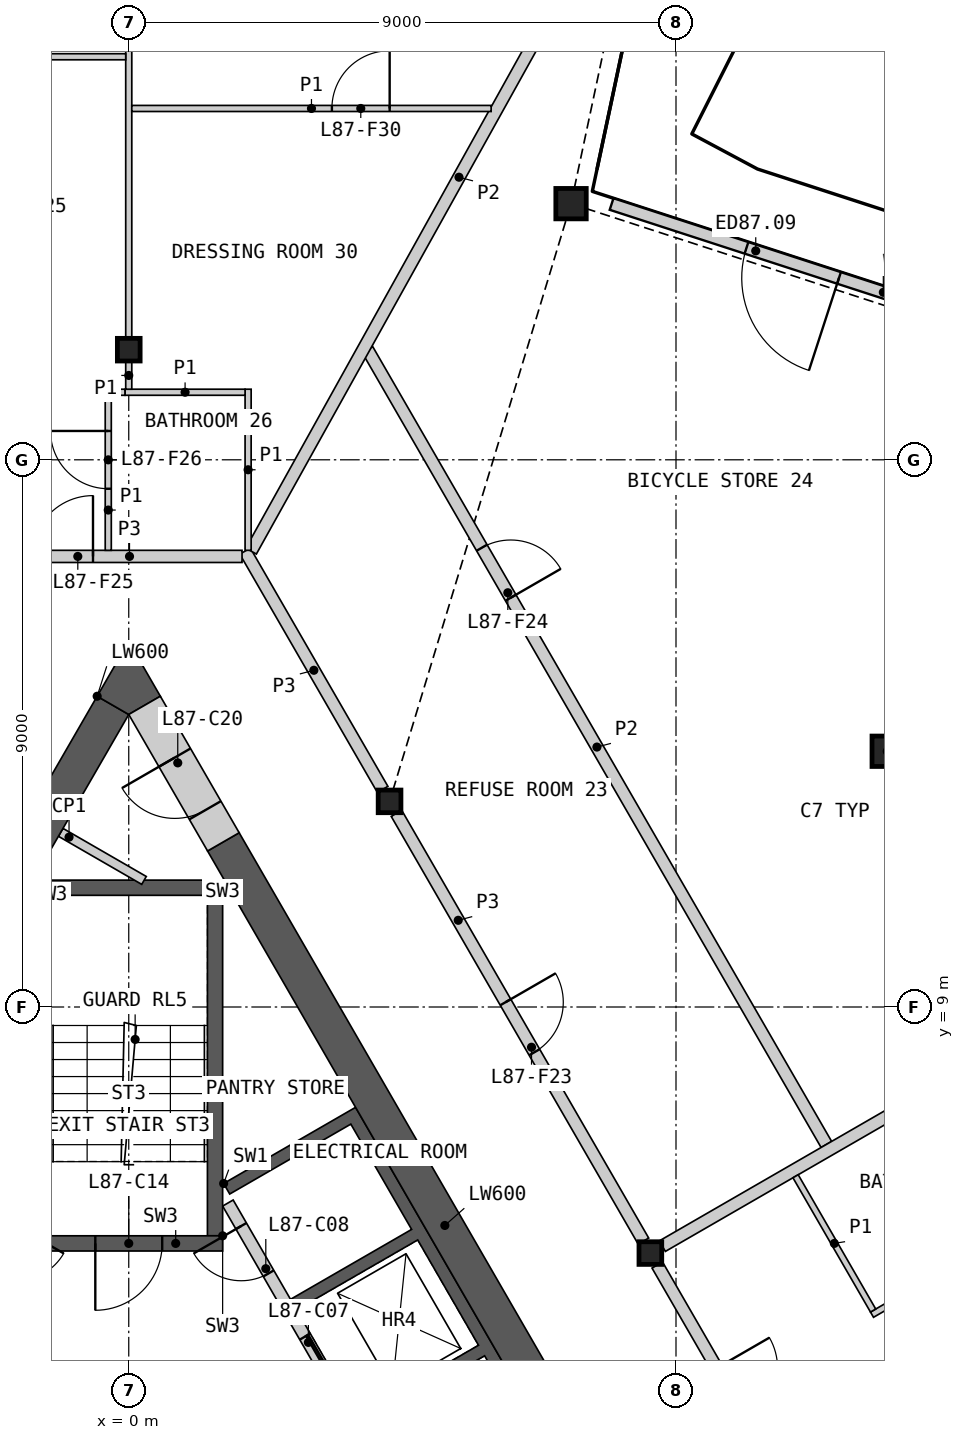
"""IFC4 building model, lengths in metres.
Left out: names, types, materials, properties, quantities, classifications, styles, units other than length and angle.
Written with IfcOpenShell. Run it as: python <this file> out.ifc"""

import sys

from ifc_helpers import new_model, si_unit, direction, frame, frame_2d, origin, origin_2d, place, context, subcontext, project, spatial, polyline, rectangle, hollow_rectangle, i_section, outline, extrude, element, fill, save


model = new_model("IFC4")
c1 = context("Model", 3, precision=1e-05, world=origin(), true_north=direction((0.0, 1.0)))
c2 = subcontext(c1, "Body", "Model", "MODEL_VIEW")
j1 = project(units=[si_unit("LENGTHUNIT", "METRE"), si_unit("PLANEANGLEUNIT", "RADIAN")], contexts=[c1])
p1 = place(None, origin())
s1 = spatial("IfcSite", under=j1, at=p1, CompositionType="ELEMENT")
p2 = place(p1, origin())
s2 = spatial("IfcBuilding", under=s1, at=p2, CompositionType="ELEMENT")
p3 = place(p2, frame((0.0, 0.0, 384.8)))
s3 = spatial("IfcBuildingStorey", under=s2, at=p3, CompositionType="ELEMENT", Elevation=384.8)
for number, where, z_axis, x_axis in (
    (1, (12.474, 13.206, 0.0), (0.0, 0.0, 1.0), (1.0, 0.0, 0.0)),
    (2, (7.274, 22.213, 0.0), (0.0, 0.0, 1.0), (1.0, 0.0, 0.0)),
):
    element("IfcColumn", number, at=place(p3, frame(where, z_axis=z_axis, x_axis=x_axis)), inside=s3, PredefinedType="COLUMN", context=c2, shape_type="SweptSolid", body=[
        extrude(hollow_rectangle(XDim=0.5, YDim=0.5, WallThickness=0.03, at=origin_2d()), origin(), (0.0, 0.0, 1.0), 3.4),
    ])
for number, where, z_axis, x_axis in (
    (3, (0.0, 19.811, 0.0), (0.0, 0.0, 1.0), (1.0, 0.0, 0.0)),
    (4, (8.578, 4.953, 0.0), (0.0, 0.0, 1.0), (1.0, 0.0, 0.0)),
    (5, (4.289, 12.382, 0.0), (0.0, 0.0, 1.0), (1.0, 0.0, 0.0)),
):
    element("IfcColumn", number, at=place(p3, frame(where, z_axis=z_axis, x_axis=x_axis)), inside=s3, PredefinedType="COLUMN", context=c2, shape_type="SweptSolid", body=[
        extrude(i_section(OverallWidth=0.374, OverallDepth=0.372, WebThickness=0.016, FlangeThickness=0.026, at=origin_2d()), origin(), (0.0, 0.0, 1.0), 3.4),
    ])
p4 = place(p3, frame((13.899, 20.271, 0.0), z_axis=(0.0, 0.0, 1.0), x_axis=(-0.951056402988, 0.3090173431, 0.0)))
e6 = element("IfcWall", 6, at=p4, inside=s3, PredefinedType="SOLIDWALL", context=c2, shape_type="SweptSolid", body=[
    extrude(rectangle(XDim=6.265, YDim=0.2, at=frame_2d((3.133, 0.0))), origin(), (0.0, 0.0, 1.0), 2.634),
])
p5 = place(p4, frame((2.333, 0.0, 0.0)))
e7 = element("IfcOpeningElement", 7, at=p5, cuts=e6, PredefinedType="OPENING", context=c2, shape_type="SweptSolid", body=[
    extrude(rectangle(XDim=1.6, YDim=2.25, at=frame_2d((0.8, 1.125))), frame((0.0, 0.11, 0.0), z_axis=(0.0, -1.0, 0.0), x_axis=(1.0, 0.0, 0.0)), (0.0, 0.0, 1.0), 0.22),
])
p6 = place(p3, origin())
e8 = element("IfcWall", 8, at=p6, inside=s3, PredefinedType="SHEAR", context=c2, shape_type="SweptSolid", body=[
    extrude(outline(polyline([(1.561, 6.097), (3.731, 7.35), (8.231, -0.444), (6.061, -1.697), (5.96, -1.524), (7.952, -0.374), (6.952, 1.358), (4.96, 0.208), (4.861, 0.381), (6.852, 1.531), (5.852, 3.263), (3.861, 2.113), (3.76, 2.287), (5.752, 3.437), (4.752, 5.169), (2.76, 4.019), (2.66, 4.192), (4.652, 5.342), (3.652, 7.074), (1.66, 5.924), (1.561, 6.097)])), origin(), (0.0, 0.0, 1.0), 3.1),
])
p7 = place(p3, frame((5.817, -1.476, 0.0), z_axis=(0.0, 0.0, 1.0), x_axis=(-0.500002616675, 0.866023893041, 0.0)))
e9 = element("IfcWall", 9, at=p7, inside=s3, PredefinedType="SOLIDWALL", context=c2, shape_type="SweptSolid", body=[
    extrude(rectangle(XDim=8.373, YDim=0.2, at=frame_2d((4.187, 0.0))), origin(), (0.0, 0.0, 1.0), 3.1),
])
p8 = place(p7, frame((0.337, 0.0, 0.0)))
e10 = element("IfcOpeningElement", 10, at=p8, cuts=e9, PredefinedType="OPENING", context=c2, shape_type="SweptSolid", body=[
    extrude(rectangle(XDim=1.1, YDim=2.1, at=frame_2d((0.55, 1.05))), frame((0.0, 0.11, 0.0), z_axis=(0.0, -1.0, 0.0), x_axis=(1.0, 0.0, 0.0)), (0.0, 0.0, 1.0), 0.22),
])
p9 = place(p7, frame((2.537, 0.0, 0.0)))
e11 = element("IfcOpeningElement", 11, at=p9, cuts=e9, PredefinedType="OPENING", context=c2, shape_type="SweptSolid", body=[
    extrude(rectangle(XDim=1.1, YDim=2.1, at=frame_2d((0.55, 1.05))), frame((0.0, 0.11, 0.0), z_axis=(0.0, -1.0, 0.0), x_axis=(1.0, 0.0, 0.0)), (0.0, 0.0, 1.0), 0.22),
])
p10 = place(p7, frame((4.737, 0.0, 0.0)))
e12 = element("IfcOpeningElement", 12, at=p10, cuts=e9, PredefinedType="OPENING", context=c2, shape_type="SweptSolid", body=[
    extrude(rectangle(XDim=1.1, YDim=2.1, at=frame_2d((0.55, 1.05))), frame((0.0, 0.11, 0.0), z_axis=(0.0, -1.0, 0.0), x_axis=(1.0, 0.0, 0.0)), (0.0, 0.0, 1.0), 0.22),
])
p11 = place(p7, frame((7.037, 0.0, 0.0)))
e13 = element("IfcOpeningElement", 13, at=p11, cuts=e9, PredefinedType="OPENING", context=c2, shape_type="SweptSolid", body=[
    extrude(rectangle(XDim=0.9, YDim=2.1, at=frame_2d((0.45, 1.05))), frame((0.0, 0.11, 0.0), z_axis=(0.0, -1.0, 0.0), x_axis=(1.0, 0.0, 0.0)), (0.0, 0.0, 1.0), 0.22),
])
p12 = place(p3, origin())
e14 = element("IfcWall", 14, at=p12, inside=s3, PredefinedType="SHEAR", context=c2, shape_type="SweptSolid", body=[
    extrude(outline(polyline([(1.544, 5.237), (1.544, 11.087), (1.294, 10.837), (1.294, 5.237), (1.544, 5.237)])), origin(), (0.0, 0.0, 1.0), 3.1),
])
p13 = place(p3, origin())
e15 = element("IfcWall", 15, at=p13, inside=s3, PredefinedType="SHEAR", context=c2, shape_type="SweptSolid", body=[
    extrude(outline(polyline([(1.544, 11.087), (-1.544, 11.087), (-1.294, 10.837), (1.294, 10.837), (1.544, 11.087)])), origin(), (0.0, 0.0, 1.0), 3.1),
])
p14 = place(p3, frame((1.544, 5.112, 0.0), z_axis=(0.0, 0.0, 1.0), x_axis=(-1.0, 0.0, 0.0)))
e16 = element("IfcWall", 16, at=p14, inside=s3, PredefinedType="SHEAR", context=c2, shape_type="SweptSolid", body=[
    extrude(rectangle(XDim=3.088, YDim=0.25, at=frame_2d((1.544, 0.0))), origin(), (0.0, 0.0, 1.0), 3.1),
])
p15 = place(p14, frame((0.994, 0.0, 0.0)))
e17 = element("IfcOpeningElement", 17, at=p15, cuts=e16, PredefinedType="OPENING", context=c2, shape_type="SweptSolid", body=[
    extrude(rectangle(XDim=1.1, YDim=2.1, at=frame_2d((0.55, 1.05))), frame((0.0, 0.135, 0.0), z_axis=(0.0, -1.0, 0.0), x_axis=(1.0, 0.0, 0.0)), (0.0, 0.0, 1.0), 0.27),
])
p16 = place(p3, frame((-1.119, 11.873, 0.0), z_axis=(0.0, 0.0, 1.0), x_axis=(0.865992812752, -0.500056445075, 0.0)))
e18 = element("IfcWall", 18, at=p16, inside=s3, PredefinedType="PARTITIONING", context=c2, shape_type="SweptSolid", body=[
    extrude(rectangle(XDim=1.582, YDim=0.15, at=frame_2d((0.791, 0.0))), origin(), (0.0, 0.0, 1.0), 3.1),
])
p17 = place(p3, frame((8.841, -0.902, 0.0), z_axis=(0.0, 0.0, 1.0), x_axis=(-0.499995618375, 0.866027933502, 0.0)))
e19 = element("IfcWall", 19, at=p17, inside=s3, PredefinedType="SHEAR", context=c2, shape_type="SweptSolid", body=[
    extrude(rectangle(XDim=14.571, YDim=0.6, at=frame_2d((7.285, 0.0))), origin(), (0.0, 0.0, 1.0), 3.1),
])
p18 = place(p3, frame((-0.26, 13.961, 0.0), z_axis=(0.0, 0.0, 1.0), x_axis=(-0.499980485389, -0.866036670257, 0.0)))
e20 = element("IfcWall", 20, at=p18, inside=s3, PredefinedType="SHEAR", context=c2, shape_type="SweptSolid", body=[
    extrude(rectangle(XDim=4.559, YDim=0.6, at=frame_2d((2.28, 0.0))), origin(), (0.0, 0.0, 1.0), 3.1),
])
p19 = place(p3, origin())
e21 = element("IfcWall", 21, at=p19, inside=s3, PredefinedType="SHEAR", context=c2, shape_type="SweptSolid", body=[
    extrude(outline(polyline([(-0.52, 14.111), (0.0, 15.011), (0.52, 14.111), (0.0, 13.811), (-0.52, 14.111)])), origin(), (0.0, 0.0, 1.0), 3.1),
])
p20 = place(p3, frame((1.556, 11.716, 0.0), z_axis=(0.0, 0.0, 1.0), x_axis=(-0.500018667571, 0.866014625789, 0.0)))
e22 = element("IfcWall", 22, at=p20, inside=s3, PredefinedType="SHEAR", context=c2, shape_type="SweptSolid", body=[
    extrude(rectangle(XDim=2.592, YDim=0.6, at=frame_2d((1.296, 0.0))), origin(), (0.0, 0.0, 1.0), 3.1),
])
p21 = place(p20, frame((0.6, 0.0, 0.0)))
e23 = element("IfcOpeningElement", 23, at=p21, cuts=e22, PredefinedType="OPENING", context=c2, shape_type="SweptSolid", body=[
    extrude(rectangle(XDim=1.0, YDim=2.1, at=frame_2d((0.5, 1.05))), frame((0.0, 0.31, 0.0), z_axis=(0.0, -1.0, 0.0), x_axis=(1.0, 0.0, 0.0)), (0.0, 0.0, 1.0), 0.62),
])
p22 = place(p3, frame((4.403, 12.185, 0.0), z_axis=(0.0, 0.0, 1.0), x_axis=(0.499992155518, -0.866029932751, 0.0)))
e24 = element("IfcWall", 24, at=p22, inside=s3, PredefinedType="PARTITIONING", context=c2, shape_type="SweptSolid", body=[
    extrude(rectangle(XDim=8.123, YDim=0.2, at=frame_2d((4.062, 0.0))), origin(), (0.0, 0.0, 1.0), 3.1),
])
p23 = place(p22, frame((3.587, 0.0, 0.0)))
e25 = element("IfcOpeningElement", 25, at=p23, cuts=e24, PredefinedType="OPENING", context=c2, shape_type="SweptSolid", body=[
    extrude(rectangle(XDim=0.95, YDim=2.1, at=frame_2d((0.475, 1.05))), frame((0.0, 0.11, 0.0), z_axis=(0.0, -1.0, 0.0), x_axis=(1.0, 0.0, 0.0)), (0.0, 0.0, 1.0), 0.22),
])
p24 = place(p3, frame((8.692, 4.756, 0.0), z_axis=(0.0, 0.0, 1.0), x_axis=(0.500001682468, -0.866024432409, 0.0)))
e26 = element("IfcWall", 26, at=p24, inside=s3, PredefinedType="PARTITIONING", context=c2, shape_type="SweptSolid", body=[
    extrude(rectangle(XDim=8.124, YDim=0.2, at=frame_2d((4.062, 0.0))), origin(), (0.0, 0.0, 1.0), 3.1),
])
p25 = place(p24, frame((1.956, 0.0, 0.0)))
e27 = element("IfcOpeningElement", 27, at=p25, cuts=e26, PredefinedType="OPENING", context=c2, shape_type="SweptSolid", body=[
    extrude(rectangle(XDim=1.0, YDim=2.1, at=frame_2d((0.5, 1.05))), frame((0.0, 0.11, 0.0), z_axis=(0.0, -1.0, 0.0), x_axis=(1.0, 0.0, 0.0)), (0.0, 0.0, 1.0), 0.22),
])
p26 = place(p3, frame((1.913, 16.498, 0.0), z_axis=(0.0, 0.0, 1.0), x_axis=(0.499974648164, -0.866040040179, 0.0)))
e28 = element("IfcWall", 28, at=p26, inside=s3, PredefinedType="PARTITIONING", context=c2, shape_type="SweptSolid", body=[
    extrude(rectangle(XDim=4.525, YDim=0.2, at=frame_2d((2.263, 0.0))), origin(), (0.0, 0.0, 1.0), 3.1),
])
p27 = place(p3, frame((-1.838, 16.411, 0.0), z_axis=(0.0, 0.0, 1.0), x_axis=(1.0, 0.0, 0.0)))
e29 = element("IfcWall", 29, at=p27, inside=s3, PredefinedType="PARTITIONING", context=c2, shape_type="SweptSolid", body=[
    extrude(rectangle(XDim=3.701, YDim=0.2, at=frame_2d((1.851, 0.0))), origin(), (0.0, 0.0, 1.0), 3.1),
])
p28 = place(p27, frame((0.25, 0.0, 0.0)))
e30 = element("IfcOpeningElement", 30, at=p28, cuts=e29, PredefinedType="OPENING", context=c2, shape_type="SweptSolid", body=[
    extrude(rectangle(XDim=1.0, YDim=2.1, at=frame_2d((0.5, 1.05))), frame((0.0, 0.11, 0.0), z_axis=(0.0, -1.0, 0.0), x_axis=(1.0, 0.0, 0.0)), (0.0, 0.0, 1.0), 0.22),
])
p29 = place(p3, frame((3.926, 19.811, 0.0), z_axis=(0.0, 0.0, 1.0), x_axis=(0.500001082559, -0.866024778768, 0.0)))
e31 = element("IfcWall", 31, at=p29, inside=s3, PredefinedType="PARTITIONING", context=c2, shape_type="SweptSolid", body=[
    extrude(rectangle(XDim=15.094, YDim=0.2, at=frame_2d((7.547, 0.0))), origin(), (0.0, 0.0, 1.0), 2.33),
])
p30 = place(p29, frame((3.761, 0.0, 0.0)))
e32 = element("IfcOpeningElement", 32, at=p30, cuts=e31, PredefinedType="OPENING", context=c2, shape_type="SweptSolid", body=[
    extrude(rectangle(XDim=0.95, YDim=2.1, at=frame_2d((0.475, 1.05))), frame((0.0, 0.11, 0.0), z_axis=(0.0, -1.0, 0.0), x_axis=(1.0, 0.0, 0.0)), (0.0, 0.0, 1.0), 0.22),
])
p31 = place(p3, frame((2.012, 16.498, 0.0), z_axis=(0.0, 0.0, 1.0), x_axis=(0.485991996179, 0.873963259897, 0.0)))
e33 = element("IfcWall", 33, at=p31, inside=s3, PredefinedType="PARTITIONING", context=c2, shape_type="SweptSolid", body=[
    extrude(rectangle(XDim=14.073, YDim=0.2, at=frame_2d((7.036, 0.0))), origin(), (0.0, 0.0, 1.0), 2.33),
])
p32 = place(p3, frame((8.775, 5.066, 0.0), z_axis=(0.0, 0.0, 1.0), x_axis=(0.866023724155, 0.500002909193, 0.0)))
e34 = element("IfcWall", 34, at=p32, inside=s3, PredefinedType="PARTITIONING", context=c2, shape_type="SweptSolid", body=[
    extrude(rectangle(XDim=11.655, YDim=0.2, at=frame_2d((5.827, 0.0))), origin(), (0.0, 0.0, 1.0), 2.33),
])
p33 = place(p3, frame((0.0, 20.008, 0.0), z_axis=(0.0, 0.0, 1.0), x_axis=(0.0, 1.0, 0.0)))
e35 = element("IfcWall", 35, at=p33, inside=s3, PredefinedType="PARTITIONING", context=c2, shape_type="SweptSolid", body=[
    extrude(rectangle(XDim=10.951, YDim=0.1, at=frame_2d((5.476, 0.0))), origin(), (0.0, 0.0, 1.0), 2.33),
])
p34 = place(p33, frame((8.851, 0.0, 0.0)))
e36 = element("IfcOpeningElement", 36, at=p34, cuts=e35, PredefinedType="OPENING", context=c2, shape_type="SweptSolid", body=[
    extrude(rectangle(XDim=0.95, YDim=2.1, at=frame_2d((0.475, 1.05))), frame((0.0, 0.06, 0.0), z_axis=(0.0, -1.0, 0.0), x_axis=(1.0, 0.0, 0.0)), (0.0, 0.0, 1.0), 0.12),
])
p35 = place(p3, frame((11.265, 0.5, 0.0), z_axis=(0.0, 0.0, 1.0), x_axis=(0.866033839264, 0.499985389037, 0.0)))
e37 = element("IfcWall", 37, at=p35, inside=s3, PredefinedType="PARTITIONING", context=c2, shape_type="SweptSolid", body=[
    extrude(rectangle(XDim=7.1, YDim=0.1, at=frame_2d((3.55, 0.0))), origin(), (0.0, 0.0, 1.0), 2.33),
])
p36 = place(p35, frame((4.588, 0.0, 0.0)))
e38 = element("IfcOpeningElement", 38, at=p36, cuts=e37, PredefinedType="OPENING", context=c2, shape_type="SweptSolid", body=[
    extrude(rectangle(XDim=0.95, YDim=2.1, at=frame_2d((0.475, 1.05))), frame((0.0, 0.06, 0.0), z_axis=(0.0, -1.0, 0.0), x_axis=(1.0, 0.0, 0.0)), (0.0, 0.0, 1.0), 0.12),
])
p37 = place(p3, frame((-6.408, 24.629, 0.0), z_axis=(0.0, 0.0, 1.0), x_axis=(1.0, 0.0, 0.0)))
e39 = element("IfcWall", 39, at=p37, inside=s3, PredefinedType="PARTITIONING", context=c2, shape_type="SweptSolid", body=[
    extrude(rectangle(XDim=6.358, YDim=0.1, at=frame_2d((3.179, 0.0))), origin(), (0.0, 0.0, 1.0), 2.33),
])
p38 = place(p37, frame((3.455, 0.0, 0.0)))
e40 = element("IfcOpeningElement", 40, at=p38, cuts=e39, PredefinedType="OPENING", context=c2, shape_type="SweptSolid", body=[
    extrude(rectangle(XDim=0.95, YDim=2.1, at=frame_2d((0.475, 1.05))), frame((0.0, 0.06, 0.0), z_axis=(0.0, -1.0, 0.0), x_axis=(1.0, 0.0, 0.0)), (0.0, 0.0, 1.0), 0.12),
])
p39 = place(p3, frame((0.05, 23.778, 0.0), z_axis=(0.0, 0.0, 1.0), x_axis=(1.0, 0.0, 0.0)))
e41 = element("IfcWall", 41, at=p39, inside=s3, PredefinedType="PARTITIONING", context=c2, shape_type="SweptSolid", body=[
    extrude(rectangle(XDim=5.91, YDim=0.1, at=frame_2d((2.955, 0.0))), origin(), (0.0, 0.0, 1.0), 2.33),
])
p40 = place(p39, frame((3.291, 0.0, 0.0)))
e42 = element("IfcOpeningElement", 42, at=p40, cuts=e41, PredefinedType="OPENING", context=c2, shape_type="SweptSolid", body=[
    extrude(rectangle(XDim=0.95, YDim=2.1, at=frame_2d((0.475, 1.05))), frame((0.0, 0.06, 0.0), z_axis=(0.0, -1.0, 0.0), x_axis=(1.0, 0.0, 0.0)), (0.0, 0.0, 1.0), 0.12),
])
p41 = place(p3, frame((12.223, 3.939, 0.0), z_axis=(0.0, 0.0, 1.0), x_axis=(0.866032775405, 0.499987231761, 0.0)))
e43 = element("IfcWall", 43, at=p41, inside=s3, PredefinedType="PARTITIONING", context=c2, shape_type="SweptSolid", body=[
    extrude(rectangle(XDim=2.9, YDim=0.1, at=frame_2d((1.45, 0.0))), origin(), (0.0, 0.0, 1.0), 2.33),
])
p42 = place(p41, frame((1.7, 0.0, 0.0)))
e44 = element("IfcOpeningElement", 44, at=p42, cuts=e43, PredefinedType="OPENING", context=c2, shape_type="SweptSolid", body=[
    extrude(rectangle(XDim=0.95, YDim=2.1, at=frame_2d((0.475, 1.05))), frame((0.0, 0.06, 0.0), z_axis=(0.0, -1.0, 0.0), x_axis=(1.0, 0.0, 0.0)), (0.0, 0.0, 1.0), 0.12),
])
p43 = place(p3, frame((10.967, 6.216, 0.0), z_axis=(0.0, 0.0, 1.0), x_axis=(0.499948979701, -0.866054858364, 0.0)))
e45 = element("IfcWall", 45, at=p43, inside=s3, PredefinedType="PARTITIONING", context=c2, shape_type="SweptSolid", body=[
    extrude(rectangle(XDim=2.55, YDim=0.1, at=frame_2d((1.275, 0.0))), origin(), (0.0, 0.0, 1.0), 2.33),
])
p44 = place(p3, frame((1.963, 16.511, 0.0), z_axis=(0.0, 0.0, 1.0), x_axis=(0.0, 1.0, 0.0)))
e46 = element("IfcWall", 46, at=p44, inside=s3, PredefinedType="PARTITIONING", context=c2, shape_type="SweptSolid", body=[
    extrude(rectangle(XDim=2.65, YDim=0.1, at=frame_2d((1.325, 0.0))), origin(), (0.0, 0.0, 1.0), 2.33),
])
p45 = place(p3, frame((-0.337, 16.511, 0.0), z_axis=(0.0, 0.0, 1.0), x_axis=(0.0, 1.0, 0.0)))
e47 = element("IfcWall", 47, at=p45, inside=s3, PredefinedType="PARTITIONING", context=c2, shape_type="SweptSolid", body=[
    extrude(rectangle(XDim=2.649, YDim=0.1, at=frame_2d((1.325, 0.0))), origin(), (0.0, 0.0, 1.0), 2.33),
])
p46 = place(p45, frame((1.013, 0.0, 0.0)))
e48 = element("IfcOpeningElement", 48, at=p46, cuts=e47, PredefinedType="OPENING", context=c2, shape_type="SweptSolid", body=[
    extrude(rectangle(XDim=0.95, YDim=2.1, at=frame_2d((0.475, 1.05))), frame((0.0, 0.06, 0.0), z_axis=(0.0, -1.0, 0.0), x_axis=(1.0, 0.0, 0.0)), (0.0, 0.0, 1.0), 0.12),
])
p47 = place(p3, frame((-0.06, 19.111, 0.0), z_axis=(0.0, 0.0, 1.0), x_axis=(1.0, 0.0, 0.0)))
e49 = element("IfcWall", 49, at=p47, inside=s3, PredefinedType="PARTITIONING", context=c2, shape_type="SweptSolid", body=[
    extrude(rectangle(XDim=1.973, YDim=0.1, at=frame_2d((0.987, 0.0))), origin(), (0.0, 0.0, 1.0), 2.33),
])
p48 = place(p3, frame((0.0, 19.161, 0.0), z_axis=(0.0, 0.0, 1.0), x_axis=(0.0, 1.0, 0.0)))
e50 = element("IfcWall", 50, at=p48, inside=s3, PredefinedType="PARTITIONING", context=c2, shape_type="SweptSolid", body=[
    extrude(rectangle(XDim=0.453, YDim=0.1, at=frame_2d((0.227, 0.0))), origin(), (0.0, 0.0, 1.0), 2.33),
])
p49 = place(p3, frame((-0.287, 19.11, 0.0), z_axis=(0.0, 0.0, 1.0), x_axis=(0.999994683407, 0.003260852229, 0.0)))
e51 = element("IfcWall", 51, at=p49, inside=s3, PredefinedType="PARTITIONING", context=c2, shape_type="SweptSolid", body=[
    extrude(rectangle(XDim=0.225, YDim=0.1, at=frame_2d((0.112, 0.0))), origin(), (0.0, 0.0, 1.0), 2.33),
])
p50 = place(p5, origin())
e52 = element("IfcDoor", 52, at=p50, inside=s3, OperationType="DOUBLE_DOOR_SINGLE_SWING", PredefinedType="DOOR", context=c2, shape_type="SweptSolid", body=[
    extrude(rectangle(XDim=1.6, YDim=2.25, at=frame_2d((0.8, 1.125))), frame((0.0, 0.025, 0.0), z_axis=(0.0, -1.0, 0.0), x_axis=(1.0, 0.0, 0.0)), (0.0, 0.0, 1.0), 0.05),
])
fill(e7, e52)
p51 = place(p10, origin())
e53 = element("IfcDoor", 53, at=p51, inside=s3, OperationType="SLIDING_TO_LEFT", PredefinedType="DOOR", context=c2, shape_type="SweptSolid", body=[
    extrude(rectangle(XDim=1.1, YDim=2.1, at=frame_2d((0.55, 1.05))), frame((0.0, 0.025, 0.0), z_axis=(0.0, -1.0, 0.0), x_axis=(1.0, 0.0, 0.0)), (0.0, 0.0, 1.0), 0.05),
])
fill(e12, e53)
p52 = place(p11, origin())
e54 = element("IfcDoor", 54, at=p52, inside=s3, OperationType="SINGLE_SWING_RIGHT", PredefinedType="DOOR", context=c2, shape_type="SweptSolid", body=[
    extrude(rectangle(XDim=0.9, YDim=2.1, at=frame_2d((0.45, 1.05))), frame((0.0, 0.025, 0.0), z_axis=(0.0, -1.0, 0.0), x_axis=(1.0, 0.0, 0.0)), (0.0, 0.0, 1.0), 0.05),
])
fill(e13, e54)
p53 = place(p15, origin())
e55 = element("IfcDoor", 55, at=p53, inside=s3, OperationType="SINGLE_SWING_RIGHT", PredefinedType="DOOR", context=c2, shape_type="SweptSolid", body=[
    extrude(rectangle(XDim=1.1, YDim=2.1, at=frame_2d((0.55, 1.05))), frame((0.0, 0.025, 0.0), z_axis=(0.0, -1.0, 0.0), x_axis=(1.0, 0.0, 0.0)), (0.0, 0.0, 1.0), 0.05),
])
fill(e17, e55)
p54 = place(p21, origin())
e56 = element("IfcDoor", 56, at=p54, inside=s3, OperationType="SINGLE_SWING_RIGHT", PredefinedType="DOOR", context=c2, shape_type="SweptSolid", body=[
    extrude(rectangle(XDim=1.0, YDim=2.1, at=frame_2d((0.5, 1.05))), frame((0.0, 0.055, 0.0), z_axis=(0.0, -1.0, 0.0), x_axis=(1.0, 0.0, 0.0)), (0.0, 0.0, 1.0), 0.05),
])
fill(e23, e56)
p55 = place(p23, origin())
e57 = element("IfcDoor", 57, at=p55, inside=s3, OperationType="SINGLE_SWING_LEFT", PredefinedType="DOOR", context=c2, shape_type="SweptSolid", body=[
    extrude(rectangle(XDim=0.95, YDim=2.1, at=frame_2d((0.475, 1.05))), frame((0.0, 0.025, 0.0), z_axis=(0.0, -1.0, 0.0), x_axis=(1.0, 0.0, 0.0)), (0.0, 0.0, 1.0), 0.05),
])
fill(e25, e57)
p56 = place(p30, origin())
e58 = element("IfcDoor", 58, at=p56, inside=s3, OperationType="SINGLE_SWING_RIGHT", PredefinedType="DOOR", context=c2, shape_type="SweptSolid", body=[
    extrude(rectangle(XDim=0.95, YDim=2.1, at=frame_2d((0.475, 1.05))), frame((0.0, 0.025, 0.0), z_axis=(0.0, -1.0, 0.0), x_axis=(1.0, 0.0, 0.0)), (0.0, 0.0, 1.0), 0.05),
])
fill(e32, e58)
p57 = place(p28, origin())
e59 = element("IfcDoor", 59, at=p57, inside=s3, OperationType="SINGLE_SWING_RIGHT", PredefinedType="DOOR", context=c2, shape_type="SweptSolid", body=[
    extrude(rectangle(XDim=1.0, YDim=2.1, at=frame_2d((0.5, 1.05))), frame((0.0, 0.025, 0.0), z_axis=(0.0, -1.0, 0.0), x_axis=(1.0, 0.0, 0.0)), (0.0, 0.0, 1.0), 0.05),
])
fill(e30, e59)
p58 = place(p46, origin())
e60 = element("IfcDoor", 60, at=p58, inside=s3, OperationType="SINGLE_SWING_RIGHT", PredefinedType="DOOR", context=c2, shape_type="SweptSolid", body=[
    extrude(rectangle(XDim=0.95, YDim=2.1, at=frame_2d((0.475, 1.05))), frame((0.0, 0.025, 0.0), z_axis=(0.0, -1.0, 0.0), x_axis=(1.0, 0.0, 0.0)), (0.0, 0.0, 1.0), 0.05),
])
fill(e48, e60)
p59 = place(p40, origin())
e61 = element("IfcDoor", 61, at=p59, inside=s3, OperationType="SINGLE_SWING_RIGHT", PredefinedType="DOOR", context=c2, shape_type="SweptSolid", body=[
    extrude(rectangle(XDim=0.95, YDim=2.1, at=frame_2d((0.475, 1.05))), frame((0.0, 0.025, 0.0), z_axis=(0.0, -1.0, 0.0), x_axis=(1.0, 0.0, 0.0)), (0.0, 0.0, 1.0), 0.05),
])
fill(e42, e61)
save(model, sys.argv[1])
